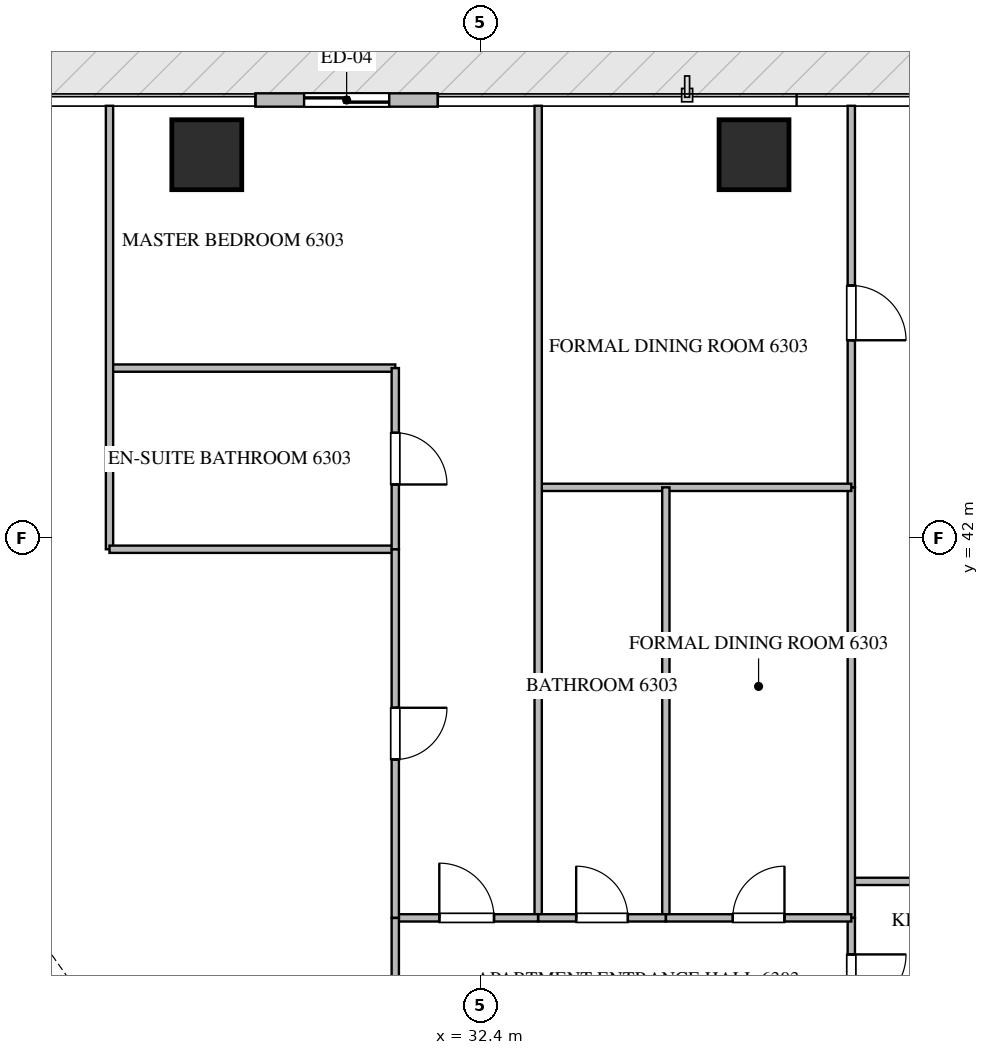
"""IFC4 building model, lengths in metres.
Left out: names, types, materials, properties, quantities, classifications, styles, units other than length and angle.
Written with IfcOpenShell. Run it as: python <this file> out.ifc"""

import sys

from ifc_helpers import new_model, si_unit, direction, frame, frame_2d, origin, origin_2d, place, context, subcontext, project, spatial, rectangle, extrude, source, transform, mapped, element, fill, save


model = new_model("IFC4")
c1 = context("Model", 3, precision=1e-05, world=origin(), true_north=direction((0.0, 1.0)))
c2 = subcontext(c1, "Body", "Model", "MODEL_VIEW")
j1 = project(units=[si_unit("LENGTHUNIT", "METRE"), si_unit("PLANEANGLEUNIT", "RADIAN")], contexts=[c1])
p1 = place(None, origin())
s1 = spatial("IfcSite", under=j1, at=p1, CompositionType="ELEMENT")
p2 = place(p1, origin())
s2 = spatial("IfcBuilding", under=s1, at=p2, CompositionType="ELEMENT")
p3 = place(p2, frame((0.0, 0.0, 252.8)))
s3 = spatial("IfcBuildingStorey", under=s2, at=p3, CompositionType="ELEMENT", Elevation=252.8)
m1 = source(origin(), c2, "Body", "SweptSolid", [
    extrude(rectangle(XDim=1.15, YDim=1.15, at=origin_2d()), origin(), (0.0, 0.0, 1.0), 3.85),
])
for number, where, z_axis, x_axis in (
    (1, (27.9, 48.3, -0.26), (0.0, 0.0, 1.0), (1.0, 0.0, 0.0)),
    (2, (36.9, 48.3, -0.26), (0.0, 0.0, 1.0), (1.0, 0.0, 0.0)),
):
    element("IfcColumn", number, at=place(p3, frame(where, z_axis=z_axis, x_axis=x_axis)), inside=s3, PredefinedType="COLUMN", context=c2, shape_type="MappedRepresentation", body=[
        mapped(m1, transform((0.0, 0.0, 0.0), scale=1.0)),
    ])
p4 = place(p3, frame((31.7, 49.2, 0.0), z_axis=(0.0, 0.0, 1.0), x_axis=(-1.0, 0.0, 0.0)))
e3 = element("IfcWall", 3, at=p4, inside=s3, PredefinedType="ELEMENTEDWALL", context=c2, shape_type="SweptSolid", body=[
    extrude(rectangle(XDim=3.0, YDim=0.22, at=frame_2d((1.5, 0.0))), origin(), (0.0, 0.0, 1.0), 3.575),
])
p5 = place(p4, frame((0.8, 0.0, 0.0)))
e4 = element("IfcOpeningElement", 4, at=p5, cuts=e3, PredefinedType="OPENING", context=c2, shape_type="SweptSolid", body=[
    extrude(rectangle(XDim=1.4, YDim=2.25, at=frame_2d((0.7, 1.125))), frame((0.0, 0.12, 0.0), z_axis=(0.0, -1.0, 0.0), x_axis=(1.0, 0.0, 0.0)), (0.0, 0.0, 1.0), 0.24),
])
p6 = place(p3, frame((38.5, 36.35, 0.0), z_axis=(0.0, 0.0, 1.0), x_axis=(1.0, 0.0, 0.0)))
e5 = element("IfcWall", 5, at=p6, inside=s3, PredefinedType="PARTITIONING", context=c2, shape_type="SweptSolid", body=[
    extrude(rectangle(XDim=2.85, YDim=0.12, at=frame_2d((1.425, 0.0))), origin(), (0.0, 0.0, 1.0), 3.59),
])
p7 = place(p6, frame((1.0, 0.0, 0.0)))
e6 = element("IfcOpeningElement", 6, at=p7, cuts=e5, PredefinedType="OPENING", context=c2, shape_type="SweptSolid", body=[
    extrude(rectangle(XDim=0.85, YDim=2.1, at=frame_2d((0.425, 1.05))), frame((0.0, 0.07, 0.0), z_axis=(0.0, -1.0, 0.0), x_axis=(1.0, 0.0, 0.0)), (0.0, 0.0, 1.0), 0.14),
])
p8 = place(p3, frame((38.5, 35.75, 0.0), z_axis=(0.0, 0.0, 1.0), x_axis=(0.0, -1.0, 0.0)))
e7 = element("IfcWall", 7, at=p8, inside=s3, PredefinedType="PARTITIONING", context=c2, shape_type="SweptSolid", body=[
    extrude(rectangle(XDim=1.975, YDim=0.12, at=frame_2d((0.988, 0.0))), origin(), (0.0, 0.0, 1.0), 3.59),
])
p9 = place(p8, frame((0.601, 0.0, 0.0)))
e8 = element("IfcOpeningElement", 8, at=p9, cuts=e7, PredefinedType="OPENING", context=c2, shape_type="SweptSolid", body=[
    extrude(rectangle(XDim=0.9, YDim=2.1, at=frame_2d((0.45, 1.05))), frame((0.0, 0.07, 0.0), z_axis=(0.0, -1.0, 0.0), x_axis=(1.0, 0.0, 0.0)), (0.0, 0.0, 1.0), 0.14),
])
p10 = place(p3, frame((38.5, 49.105, 0.0), z_axis=(0.0, 0.0, 1.0), x_axis=(0.0, -1.0, 0.0)))
e9 = element("IfcWall", 9, at=p10, inside=s3, PredefinedType="PARTITIONING", context=c2, shape_type="SweptSolid", body=[
    extrude(rectangle(XDim=6.275, YDim=0.12, at=frame_2d((3.137, 0.0))), origin(), (0.0, 0.0, 1.0), 3.59),
])
p11 = place(p10, frame((2.956, 0.0, 0.0)))
e10 = element("IfcOpeningElement", 10, at=p11, cuts=e9, PredefinedType="OPENING", context=c2, shape_type="SweptSolid", body=[
    extrude(rectangle(XDim=0.9, YDim=2.1, at=frame_2d((0.45, 1.05))), frame((0.0, 0.07, 0.0), z_axis=(0.0, -1.0, 0.0), x_axis=(1.0, 0.0, 0.0)), (0.0, 0.0, 1.0), 0.14),
])
p12 = place(p3, frame((38.5, 42.828, 0.0), z_axis=(0.0, 0.0, 1.0), x_axis=(0.0, -1.0, 0.0)))
e11 = element("IfcWall", 11, at=p12, inside=s3, PredefinedType="PARTITIONING", context=c2, shape_type="SweptSolid", body=[
    extrude(rectangle(XDim=7.076, YDim=0.12, at=frame_2d((3.538, 0.0))), origin(), (0.0, 0.0, 1.0), 3.59),
])
p13 = place(p3, frame((33.35, 42.83, 0.0), z_axis=(0.0, 0.0, 1.0), x_axis=(1.0, 0.0, 0.0)))
e12 = element("IfcWall", 12, at=p13, inside=s3, PredefinedType="PARTITIONING", context=c2, shape_type="SweptSolid", body=[
    extrude(rectangle(XDim=5.15, YDim=0.12, at=frame_2d((2.575, 0.0))), origin(), (0.0, 0.0, 1.0), 3.59),
])
p14 = place(p3, frame((33.35, 49.105, 0.0), z_axis=(0.0, 0.0, 1.0), x_axis=(0.0, -1.0, 0.0)))
e13 = element("IfcWall", 13, at=p14, inside=s3, PredefinedType="PARTITIONING", context=c2, shape_type="SweptSolid", body=[
    extrude(rectangle(XDim=13.355, YDim=0.12, at=frame_2d((6.677, 0.0))), origin(), (0.0, 0.0, 1.0), 3.59),
])
p15 = place(p3, frame((35.45, 42.83, 0.0), z_axis=(0.0, 0.0, 1.0), x_axis=(0.0, -1.0, 0.0)))
e14 = element("IfcWall", 14, at=p15, inside=s3, PredefinedType="PARTITIONING", context=c2, shape_type="SweptSolid", body=[
    extrude(rectangle(XDim=7.08, YDim=0.12, at=frame_2d((3.54, 0.0))), origin(), (0.0, 0.0, 1.0), 3.59),
])
p16 = place(p3, frame((33.35, 35.75, 0.0), z_axis=(0.0, 0.0, 1.0), x_axis=(1.0, 0.0, 0.0)))
e15 = element("IfcWall", 15, at=p16, inside=s3, PredefinedType="PARTITIONING", context=c2, shape_type="SweptSolid", body=[
    extrude(rectangle(XDim=2.1, YDim=0.12, at=frame_2d((1.05, 0.0))), origin(), (0.0, 0.0, 1.0), 3.59),
])
p17 = place(p16, frame((0.625, 0.0, 0.0)))
e16 = element("IfcOpeningElement", 16, at=p17, cuts=e15, PredefinedType="OPENING", context=c2, shape_type="SweptSolid", body=[
    extrude(rectangle(XDim=0.85, YDim=2.1, at=frame_2d((0.425, 1.05))), frame((0.0, 0.07, 0.0), z_axis=(0.0, -1.0, 0.0), x_axis=(1.0, 0.0, 0.0)), (0.0, 0.0, 1.0), 0.14),
])
p18 = place(p3, frame((35.452, 35.75, 0.0), z_axis=(0.0, 0.0, 1.0), x_axis=(1.0, 0.0, 0.0)))
e17 = element("IfcWall", 17, at=p18, inside=s3, PredefinedType="PARTITIONING", context=c2, shape_type="SweptSolid", body=[
    extrude(rectangle(XDim=3.048, YDim=0.12, at=frame_2d((1.524, 0.0))), origin(), (0.0, 0.0, 1.0), 3.59),
])
p19 = place(p18, frame((1.099, 0.0, 0.0)))
e18 = element("IfcOpeningElement", 18, at=p19, cuts=e17, PredefinedType="OPENING", context=c2, shape_type="SweptSolid", body=[
    extrude(rectangle(XDim=0.85, YDim=2.1, at=frame_2d((0.425, 1.05))), frame((0.0, 0.07, 0.0), z_axis=(0.0, -1.0, 0.0), x_axis=(1.0, 0.0, 0.0)), (0.0, 0.0, 1.0), 0.14),
])
p20 = place(p3, frame((31.0, 35.75, 0.0), z_axis=(0.0, 0.0, 1.0), x_axis=(1.0, 0.0, 0.0)))
e19 = element("IfcWall", 19, at=p20, inside=s3, PredefinedType="PARTITIONING", context=c2, shape_type="SweptSolid", body=[
    extrude(rectangle(XDim=2.348, YDim=0.12, at=frame_2d((1.174, 0.0))), origin(), (0.0, 0.0, 1.0), 3.59),
])
p21 = place(p20, frame((0.724, 0.0, 0.0)))
e20 = element("IfcOpeningElement", 20, at=p21, cuts=e19, PredefinedType="OPENING", context=c2, shape_type="SweptSolid", body=[
    extrude(rectangle(XDim=0.9, YDim=2.1, at=frame_2d((0.45, 1.05))), frame((0.0, 0.07, 0.0), z_axis=(0.0, -1.0, 0.0), x_axis=(1.0, 0.0, 0.0)), (0.0, 0.0, 1.0), 0.14),
])
p22 = place(p3, frame((26.3, 44.791, 0.0), z_axis=(0.0, 0.0, 1.0), x_axis=(1.0, 0.0, 0.0)))
e21 = element("IfcWall", 21, at=p22, inside=s3, PredefinedType="PARTITIONING", context=c2, shape_type="SweptSolid", body=[
    extrude(rectangle(XDim=4.7, YDim=0.12, at=frame_2d((2.35, 0.0))), origin(), (0.0, 0.0, 1.0), 3.59),
])
p23 = place(p3, frame((26.3, 49.105, 0.0), z_axis=(0.0, 0.0, 1.0), x_axis=(0.0, -1.0, 0.0)))
e22 = element("IfcWall", 22, at=p23, inside=s3, PredefinedType="PARTITIONING", context=c2, shape_type="SweptSolid", body=[
    extrude(rectangle(XDim=7.293, YDim=0.12, at=frame_2d((3.646, 0.0))), origin(), (0.0, 0.0, 1.0), 3.59),
])
p24 = place(p3, frame((26.3, 41.812, 0.0), z_axis=(0.0, 0.0, 1.0), x_axis=(1.0, 0.0, 0.0)))
e23 = element("IfcWall", 23, at=p24, inside=s3, PredefinedType="PARTITIONING", context=c2, shape_type="SweptSolid", body=[
    extrude(rectangle(XDim=4.7, YDim=0.12, at=frame_2d((2.35, 0.0))), origin(), (0.0, 0.0, 1.0), 3.59),
])
p25 = place(p3, frame((31.0, 44.791, 0.0), z_axis=(0.0, 0.0, 1.0), x_axis=(0.0, -1.0, 0.0)))
e24 = element("IfcWall", 24, at=p25, inside=s3, PredefinedType="PARTITIONING", context=c2, shape_type="SweptSolid", body=[
    extrude(rectangle(XDim=2.979, YDim=0.12, at=frame_2d((1.49, 0.0))), origin(), (0.0, 0.0, 1.0), 3.59),
])
p26 = place(p25, frame((1.064, 0.0, 0.0)))
e25 = element("IfcOpeningElement", 25, at=p26, cuts=e24, PredefinedType="OPENING", context=c2, shape_type="SweptSolid", body=[
    extrude(rectangle(XDim=0.85, YDim=2.1, at=frame_2d((0.425, 1.05))), frame((0.0, 0.07, 0.0), z_axis=(0.0, -1.0, 0.0), x_axis=(1.0, 0.0, 0.0)), (0.0, 0.0, 1.0), 0.14),
])
p27 = place(p3, frame((31.0, 41.81, 0.0), z_axis=(0.0, 0.0, 1.0), x_axis=(0.0, -1.0, 0.0)))
e26 = element("IfcWall", 26, at=p27, inside=s3, PredefinedType="PARTITIONING", context=c2, shape_type="SweptSolid", body=[
    extrude(rectangle(XDim=6.06, YDim=0.12, at=frame_2d((3.03, 0.0))), origin(), (0.0, 0.0, 1.0), 3.59),
])
p28 = place(p27, frame((2.605, 0.0, 0.0)))
e27 = element("IfcOpeningElement", 27, at=p28, cuts=e26, PredefinedType="OPENING", context=c2, shape_type="SweptSolid", body=[
    extrude(rectangle(XDim=0.85, YDim=2.1, at=frame_2d((0.425, 1.05))), frame((0.0, 0.07, 0.0), z_axis=(0.0, -1.0, 0.0), x_axis=(1.0, 0.0, 0.0)), (0.0, 0.0, 1.0), 0.14),
])
p29 = place(p3, frame((31.0, 35.748, 0.0), z_axis=(0.0, 0.0, 1.0), x_axis=(0.0, -1.0, 0.0)))
e28 = element("IfcWall", 28, at=p29, inside=s3, PredefinedType="PARTITIONING", context=c2, shape_type="SweptSolid", body=[
    extrude(rectangle(XDim=1.973, YDim=0.12, at=frame_2d((0.987, 0.0))), origin(), (0.0, 0.0, 1.0), 3.59),
])
m2 = source(origin(), c2, "Body", "SweptSolid", [
    extrude(rectangle(XDim=1.4, YDim=2.25, at=frame_2d((0.7, 1.125))), frame((0.0, 0.025, 0.0), z_axis=(0.0, -1.0, 0.0), x_axis=(1.0, 0.0, 0.0)), (0.0, 0.0, 1.0), 0.05),
])
p30 = place(p5, origin())
e29 = element("IfcDoor", 29, at=p30, inside=s3, OperationType="SLIDING_TO_LEFT", PredefinedType="DOOR", context=c2, shape_type="MappedRepresentation", body=[
    mapped(m2, transform((0.0, 0.0, 0.0), scale=1.0)),
])
fill(e4, e29)
m3 = source(origin(), c2, "Body", "SweptSolid", [
    extrude(rectangle(XDim=0.9, YDim=2.1, at=frame_2d((0.45, 1.05))), frame((0.0, 0.025, 0.0), z_axis=(0.0, -1.0, 0.0), x_axis=(1.0, 0.0, 0.0)), (0.0, 0.0, 1.0), 0.05),
])
p31 = place(p9, origin())
e30 = element("IfcDoor", 30, at=p31, inside=s3, OperationType="SINGLE_SWING_LEFT", PredefinedType="DOOR", context=c2, shape_type="MappedRepresentation", body=[
    mapped(m3, transform((0.0, 0.0, 0.0), scale=1.0)),
])
fill(e8, e30)
p32 = place(p11, origin())
e31 = element("IfcDoor", 31, at=p32, inside=s3, OperationType="SINGLE_SWING_RIGHT", PredefinedType="DOOR", context=c2, shape_type="MappedRepresentation", body=[
    mapped(m3, transform((0.0, 0.0, 0.0), scale=1.0)),
])
fill(e10, e31)
m4 = source(origin(), c2, "Body", "SweptSolid", [
    extrude(rectangle(XDim=0.85, YDim=2.1, at=frame_2d((0.425, 1.05))), frame((0.0, 0.025, 0.0), z_axis=(0.0, -1.0, 0.0), x_axis=(1.0, 0.0, 0.0)), (0.0, 0.0, 1.0), 0.05),
])
p33 = place(p17, origin())
e32 = element("IfcDoor", 32, at=p33, inside=s3, OperationType="SINGLE_SWING_LEFT", PredefinedType="DOOR", context=c2, shape_type="MappedRepresentation", body=[
    mapped(m4, transform((0.0, 0.0, 0.0), scale=1.0)),
])
fill(e16, e32)
p34 = place(p19, origin())
e33 = element("IfcDoor", 33, at=p34, inside=s3, OperationType="SINGLE_SWING_RIGHT", PredefinedType="DOOR", context=c2, shape_type="MappedRepresentation", body=[
    mapped(m4, transform((0.0, 0.0, 0.0), scale=1.0)),
])
fill(e18, e33)
p35 = place(p21, origin())
e34 = element("IfcDoor", 34, at=p35, inside=s3, OperationType="SINGLE_SWING_LEFT", PredefinedType="DOOR", context=c2, shape_type="MappedRepresentation", body=[
    mapped(m3, transform((0.0, 0.0, 0.0), scale=1.0)),
])
fill(e20, e34)
p36 = place(p26, origin())
e35 = element("IfcDoor", 35, at=p36, inside=s3, OperationType="SINGLE_SWING_RIGHT", PredefinedType="DOOR", context=c2, shape_type="MappedRepresentation", body=[
    mapped(m4, transform((0.0, 0.0, 0.0), scale=1.0)),
])
fill(e25, e35)
p37 = place(p28, origin())
e36 = element("IfcDoor", 36, at=p37, inside=s3, OperationType="SINGLE_SWING_LEFT", PredefinedType="DOOR", context=c2, shape_type="MappedRepresentation", body=[
    mapped(m4, transform((0.0, 0.0, 0.0), scale=1.0)),
])
fill(e27, e36)
save(model, sys.argv[1])
